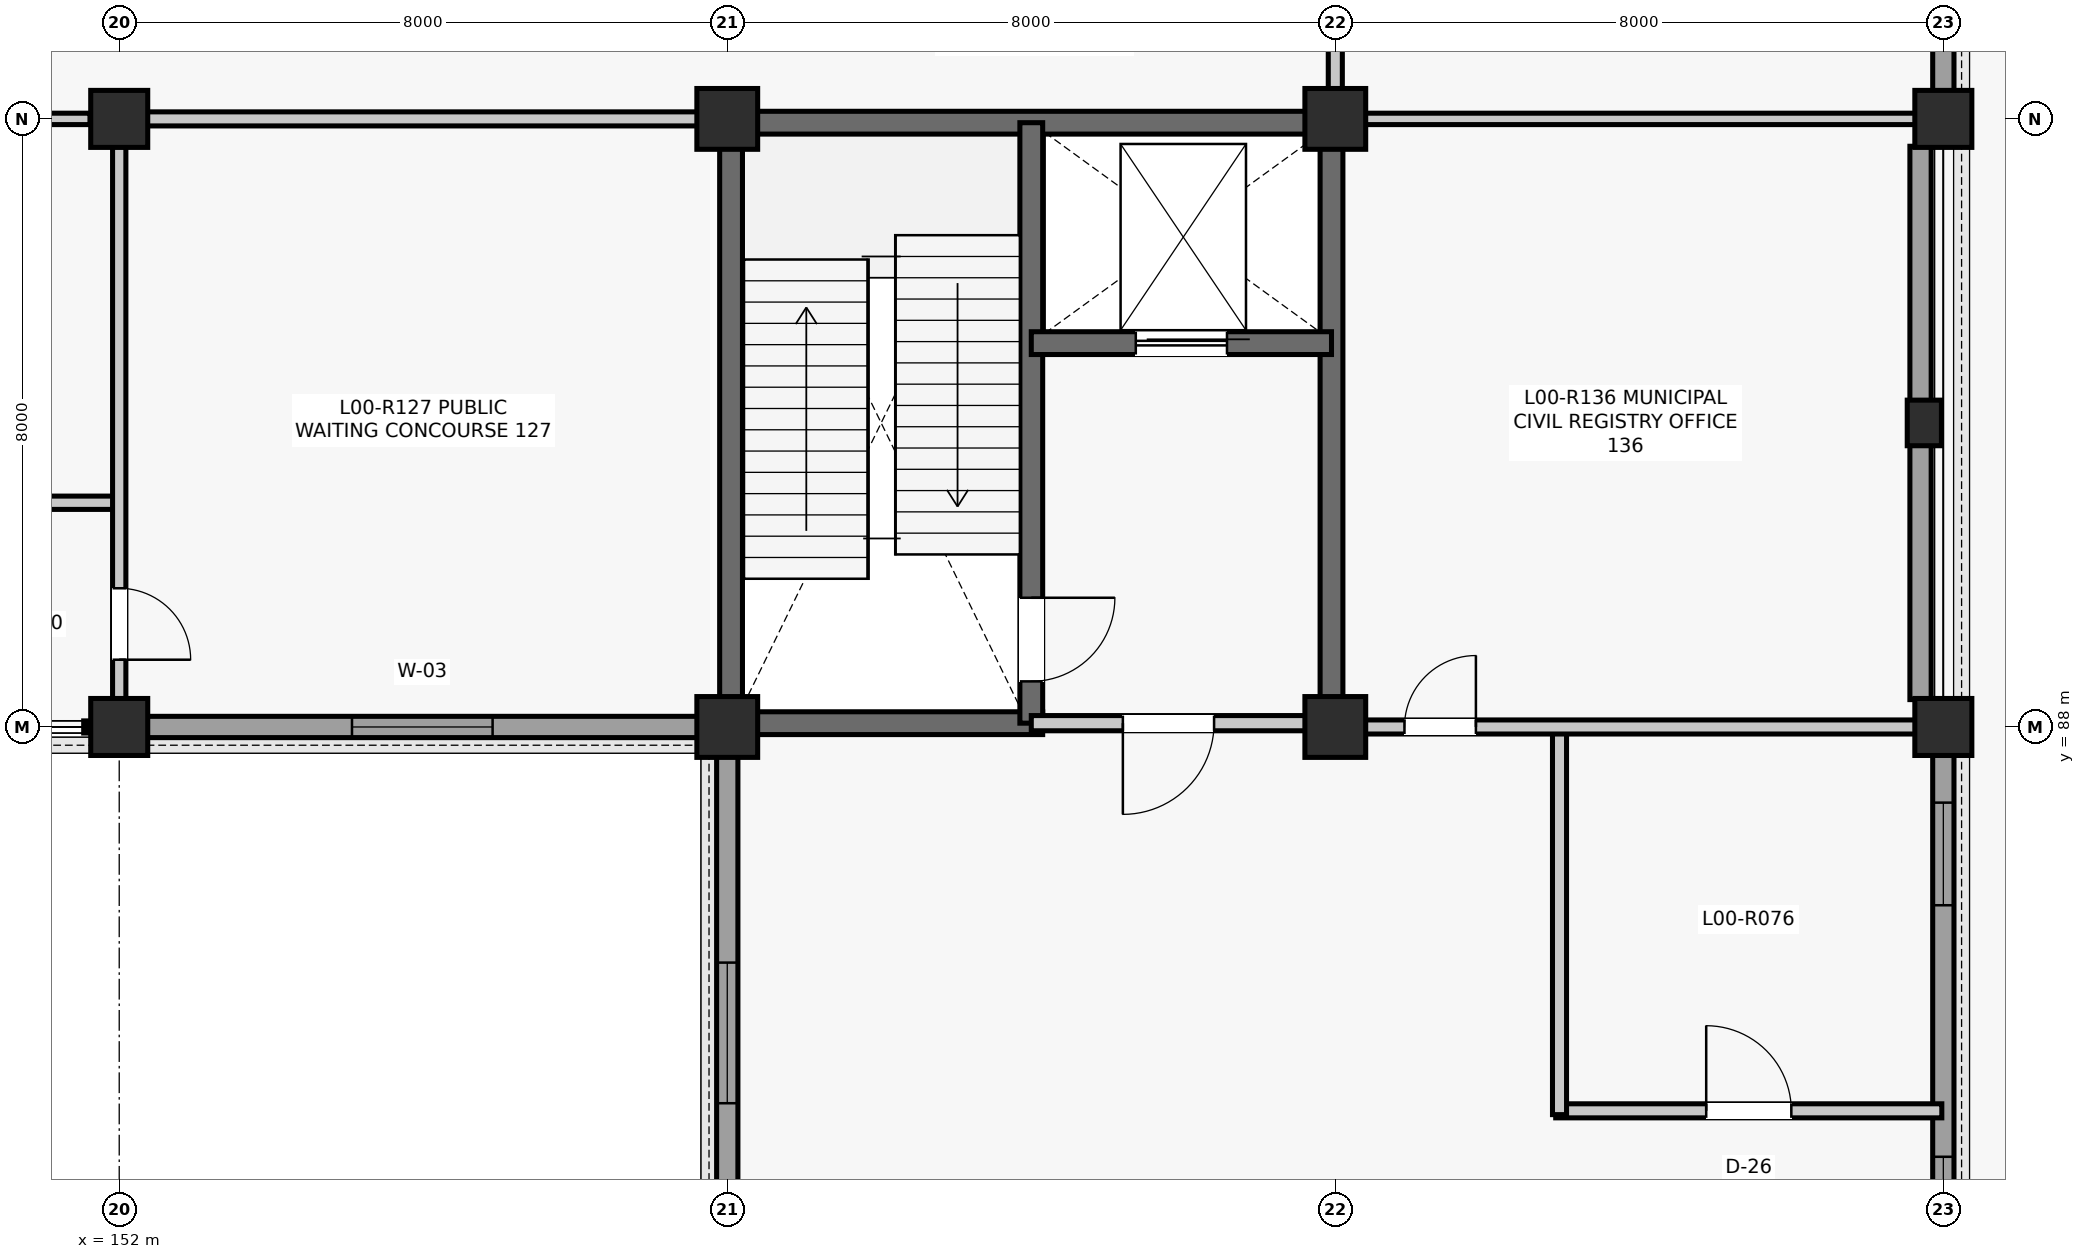
"""IFC4 building model, lengths in metres.
Left out: names, types, materials, properties, quantities, classifications, styles, units other than length and angle.
Written with IfcOpenShell. Run it as: python <this file> out.ifc"""

import sys

from ifc_helpers import new_model, si_unit, direction, frame, frame_2d, origin, origin_2d, place, context, subcontext, project, spatial, rectangle, extrude, element, fill, save


model = new_model("IFC4")
c1 = context("Model", 3, precision=1e-05, world=origin(), true_north=direction((0.0, 1.0)))
c2 = subcontext(c1, "Body", "Model", "MODEL_VIEW")
j1 = project(units=[si_unit("LENGTHUNIT", "METRE"), si_unit("PLANEANGLEUNIT", "RADIAN")], contexts=[c1])
p1 = place(None, origin())
s1 = spatial("IfcSite", under=j1, at=p1, CompositionType="ELEMENT")
p2 = place(p1, origin())
s2 = spatial("IfcBuilding", under=s1, at=p2, CompositionType="ELEMENT")
p3 = place(p2, origin())
s3 = spatial("IfcBuildingStorey", under=s2, at=p3, CompositionType="ELEMENT", Elevation=0.0)
for number, where, z_axis, x_axis in (
    (1, (152.0, 88.0, 0.0), (0.0, 0.0, 1.0), (1.0, 0.0, 0.0)),
    (2, (152.0, 96.0, 0.0), (0.0, 0.0, 1.0), (1.0, 0.0, 0.0)),
):
    element("IfcColumn", number, at=place(p3, frame(where, z_axis=z_axis, x_axis=x_axis)), inside=s3, PredefinedType="COLUMN", context=c2, shape_type="SweptSolid", body=[
        extrude(rectangle(XDim=0.75, YDim=0.75, at=origin_2d()), origin(), (0.0, 0.0, 1.0), 5.28),
    ])
for number, where, z_axis, x_axis in (
    (3, (160.0, 88.0, 0.0), (0.0, 0.0, 1.0), (1.0, 0.0, 0.0)),
    (4, (160.0, 96.0, 0.0), (0.0, 0.0, 1.0), (1.0, 0.0, 0.0)),
    (5, (168.0, 88.0, 0.0), (0.0, 0.0, 1.0), (1.0, 0.0, 0.0)),
    (6, (168.0, 96.0, 0.0), (0.0, 0.0, 1.0), (1.0, 0.0, 0.0)),
):
    element("IfcColumn", number, at=place(p3, frame(where, z_axis=z_axis, x_axis=x_axis)), inside=s3, PredefinedType="COLUMN", context=c2, shape_type="SweptSolid", body=[
        extrude(rectangle(XDim=0.8, YDim=0.8, at=origin_2d()), origin(), (0.0, 0.0, 1.0), 5.28),
    ])
for number, where, z_axis, x_axis in (
    (7, (176.0, 88.0, 0.0), (0.0, 0.0, 1.0), (1.0, 0.0, 0.0)),
    (8, (176.0, 96.0, 0.0), (0.0, 0.0, 1.0), (1.0, 0.0, 0.0)),
):
    element("IfcColumn", number, at=place(p3, frame(where, z_axis=z_axis, x_axis=x_axis)), inside=s3, PredefinedType="COLUMN", context=c2, shape_type="SweptSolid", body=[
        extrude(rectangle(XDim=0.75, YDim=0.75, at=origin_2d()), origin(), (0.0, 0.0, 1.0), 5.28),
    ])
p4 = place(p3, frame((175.75, 92.0, 0.0), z_axis=(0.0, 0.0, 1.0), x_axis=(1.0, 0.0, 0.0)))
e9 = element("IfcColumn", 9, at=p4, inside=s3, PredefinedType="PILASTER", context=c2, shape_type="SweptSolid", body=[
    extrude(rectangle(XDim=0.45, YDim=0.6, at=origin_2d()), origin(), (0.0, 0.0, 1.0), 5.28),
])
p5 = place(p3, frame((152.36, 88.0, 0.0), z_axis=(0.0, 0.0, 1.0), x_axis=(1.0, 0.0, 0.0)))
e10 = element("IfcWall", 10, at=p5, inside=s3, PredefinedType="SOLIDWALL", context=c2, shape_type="SweptSolid", body=[
    extrude(rectangle(XDim=7.255, YDim=0.28, at=frame_2d((3.627, 0.0))), origin(), (0.0, 0.0, 1.0), 4.614),
])
p6 = place(p5, frame((2.702, 0.0, 0.9)))
e11 = element("IfcOpeningElement", 11, at=p6, cuts=e10, PredefinedType="OPENING", context=c2, shape_type="SweptSolid", body=[
    extrude(rectangle(XDim=1.85, YDim=2.65, at=frame_2d((0.925, 1.325))), frame((0.0, 0.15, 0.0), z_axis=(0.0, -1.0, 0.0), x_axis=(1.0, 0.0, 0.0)), (0.0, 0.0, 1.0), 0.3),
])
p7 = place(p3, frame((160.0, 80.335, 0.0), z_axis=(0.0, 0.0, 1.0), x_axis=(0.0, 1.0, 0.0)))
e12 = element("IfcWall", 12, at=p7, inside=s3, PredefinedType="SOLIDWALL", context=c2, shape_type="SweptSolid", body=[
    extrude(rectangle(XDim=7.28, YDim=0.28, at=frame_2d((3.64, 0.0))), origin(), (0.0, 0.0, 1.0), 4.619),
])
p8 = place(p7, frame((2.715, 0.0, 0.9)))
e13 = element("IfcOpeningElement", 13, at=p8, cuts=e12, PredefinedType="OPENING", context=c2, shape_type="SweptSolid", body=[
    extrude(rectangle(XDim=1.85, YDim=2.65, at=frame_2d((0.925, 1.325))), frame((0.0, 0.15, 0.0), z_axis=(0.0, -1.0, 0.0), x_axis=(1.0, 0.0, 0.0)), (0.0, 0.0, 1.0), 0.3),
])
p9 = place(p3, frame((176.0, 80.36, 0.0), z_axis=(0.0, 0.0, 1.0), x_axis=(0.0, 1.0, 0.0)))
e14 = element("IfcWall", 14, at=p9, inside=s3, PredefinedType="SOLIDWALL", context=c2, shape_type="SweptSolid", body=[
    extrude(rectangle(XDim=7.28, YDim=0.28, at=frame_2d((3.64, 0.0))), origin(), (0.0, 0.0, 1.0), 4.61),
])
p10 = place(p9, frame((0.635, 0.0, 0.95)))
e15 = element("IfcOpeningElement", 15, at=p10, cuts=e14, PredefinedType="OPENING", context=c2, shape_type="SweptSolid", body=[
    extrude(rectangle(XDim=1.35, YDim=1.9, at=frame_2d((0.675, 0.95))), frame((0.0, 0.15, 0.0), z_axis=(0.0, -1.0, 0.0), x_axis=(1.0, 0.0, 0.0)), (0.0, 0.0, 1.0), 0.3),
])
p11 = place(p9, frame((5.295, 0.0, 0.95)))
e16 = element("IfcOpeningElement", 16, at=p11, cuts=e14, PredefinedType="OPENING", context=c2, shape_type="SweptSolid", body=[
    extrude(rectangle(XDim=1.35, YDim=1.9, at=frame_2d((0.675, 0.95))), frame((0.0, 0.15, 0.0), z_axis=(0.0, -1.0, 0.0), x_axis=(1.0, 0.0, 0.0)), (0.0, 0.0, 1.0), 0.3),
])
p12 = place(p3, frame((175.7, 88.36, 0.0), z_axis=(0.0, 0.0, 1.0), x_axis=(0.0, 1.0, 0.0)))
e17 = element("IfcWall", 17, at=p12, inside=s3, PredefinedType="SOLIDWALL", context=c2, shape_type="SweptSolid", body=[
    extrude(rectangle(XDim=7.28, YDim=0.28, at=frame_2d((3.64, 0.0))), origin(), (0.0, 0.0, 1.0), 4.674),
])
p13 = place(p3, frame((176.0, 96.36, 0.0), z_axis=(0.0, 0.0, 1.0), x_axis=(0.0, 1.0, 0.0)))
e18 = element("IfcWall", 18, at=p13, inside=s3, PredefinedType="SOLIDWALL", context=c2, shape_type="SweptSolid", body=[
    extrude(rectangle(XDim=7.28, YDim=0.28, at=frame_2d((3.64, 0.0))), origin(), (0.0, 0.0, 1.0), 4.614),
])
p14 = place(p13, frame((2.54, 0.0, 0.0)))
e19 = element("IfcOpeningElement", 19, at=p14, cuts=e18, PredefinedType="OPENING", context=c2, shape_type="SweptSolid", body=[
    extrude(rectangle(XDim=2.2, YDim=2.5, at=frame_2d((1.1, 1.25))), frame((0.0, 0.15, 0.0), z_axis=(0.0, -1.0, 0.0), x_axis=(1.0, 0.0, 0.0)), (0.0, 0.0, 1.0), 0.3),
])
for number, where, z_axis, x_axis in (
    (20, (160.05, 88.29, 0.0), (0.0, 0.0, 1.0), (0.0, 1.0, 0.0)),
    (21, (160.29, 95.95, 0.0), (0.0, 0.0, 1.0), (1.0, 0.0, 0.0)),
    (22, (167.95, 88.29, 0.0), (0.0, 0.0, 1.0), (0.0, 1.0, 0.0)),
):
    element("IfcWall", number, at=place(p3, frame(where, z_axis=z_axis, x_axis=x_axis)), inside=s3, PredefinedType="SHEAR", context=c2, shape_type="SweptSolid", body=[
        extrude(rectangle(XDim=7.42, YDim=0.3, at=frame_2d((3.71, 0.0))), origin(), (0.0, 0.0, 1.0), 5.035),
    ])
p15 = place(p3, frame((160.29, 88.05, 0.0), z_axis=(0.0, 0.0, 1.0), x_axis=(1.0, 0.0, 0.0)))
e23 = element("IfcWall", 23, at=p15, inside=s3, PredefinedType="SHEAR", context=c2, shape_type="SweptSolid", body=[
    extrude(rectangle(XDim=3.86, YDim=0.3, at=frame_2d((1.93, 0.0))), origin(), (0.0, 0.0, 1.0), 5.035),
])
p16 = place(p3, frame((164.0, 88.05, 0.0), z_axis=(0.0, 0.0, 1.0), x_axis=(0.0, 1.0, 0.0)))
e24 = element("IfcWall", 24, at=p16, inside=s3, PredefinedType="SHEAR", context=c2, shape_type="SweptSolid", body=[
    extrude(rectangle(XDim=7.9, YDim=0.3, at=frame_2d((3.95, 0.0))), origin(), (0.0, 0.0, 1.0), 5.035),
])
p17 = place(p16, frame((0.55, 0.0, 0.0)))
e25 = element("IfcOpeningElement", 25, at=p17, cuts=e24, PredefinedType="OPENING", context=c2, shape_type="SweptSolid", body=[
    extrude(rectangle(XDim=1.1, YDim=2.15, at=frame_2d((0.55, 1.075))), frame((0.0, 0.16, 0.0), z_axis=(0.0, -1.0, 0.0), x_axis=(1.0, 0.0, 0.0)), (0.0, 0.0, 1.0), 0.32),
])
p18 = place(p3, frame((164.0, 93.05, 0.0), z_axis=(0.0, 0.0, 1.0), x_axis=(1.0, 0.0, 0.0)))
e26 = element("IfcWall", 26, at=p18, inside=s3, PredefinedType="SHEAR", context=c2, shape_type="SweptSolid", body=[
    extrude(rectangle(XDim=3.95, YDim=0.3, at=frame_2d((1.975, 0.0))), origin(), (0.0, 0.0, 1.0), 5.035),
])
p19 = place(p18, frame((1.375, 0.0, 0.0)))
e27 = element("IfcOpeningElement", 27, at=p19, cuts=e26, PredefinedType="OPENING", context=c2, shape_type="SweptSolid", body=[
    extrude(rectangle(XDim=1.2, YDim=2.2, at=frame_2d((0.6, 1.1))), frame((0.0, 0.16, 0.0), z_axis=(0.0, -1.0, 0.0), x_axis=(1.0, 0.0, 0.0)), (0.0, 0.0, 1.0), 0.32),
])
p20 = place(p3, frame((164.0, 88.05, 0.0), z_axis=(0.0, 0.0, 1.0), x_axis=(1.0, 0.0, 0.0)))
e28 = element("IfcWall", 28, at=p20, inside=s3, PredefinedType="PARTITIONING", context=c2, shape_type="SweptSolid", body=[
    extrude(rectangle(XDim=3.61, YDim=0.2, at=frame_2d((1.805, 0.0))), origin(), (0.0, 0.0, 1.0), 4.404),
])
p21 = place(p20, frame((1.205, 0.0, 0.0)))
e29 = element("IfcOpeningElement", 29, at=p21, cuts=e28, PredefinedType="OPENING", context=c2, shape_type="SweptSolid", body=[
    extrude(rectangle(XDim=1.2, YDim=2.15, at=frame_2d((0.6, 1.075))), frame((0.0, 0.11, 0.0), z_axis=(0.0, -1.0, 0.0), x_axis=(1.0, 0.0, 0.0)), (0.0, 0.0, 1.0), 0.22),
])
p22 = place(p3, frame((146.9, 90.95, 0.0), z_axis=(0.0, 0.0, 1.0), x_axis=(1.0, 0.0, 0.0)))
e30 = element("IfcWall", 30, at=p22, inside=s3, PredefinedType="PARTITIONING", context=c2, shape_type="SweptSolid", body=[
    extrude(rectangle(XDim=5.08, YDim=0.175, at=frame_2d((2.54, 0.0))), origin(), (0.0, 0.0, 1.0), 4.404),
])
p23 = place(p22, frame((2.05, 0.0, 0.0)))
e31 = element("IfcOpeningElement", 31, at=p23, cuts=e30, PredefinedType="OPENING", context=c2, shape_type="SweptSolid", body=[
    extrude(rectangle(XDim=0.98, YDim=2.15, at=frame_2d((0.49, 1.075))), frame((0.0, 0.097, 0.0), z_axis=(0.0, -1.0, 0.0), x_axis=(1.0, 0.0, 0.0)), (0.0, 0.0, 1.0), 0.195),
])
p24 = place(p3, frame((146.95, 96.0, 0.0), z_axis=(0.0, 0.0, 1.0), x_axis=(1.0, 0.0, 0.0)))
e32 = element("IfcWall", 32, at=p24, inside=s3, PredefinedType="PARTITIONING", context=c2, shape_type="SweptSolid", body=[
    extrude(rectangle(XDim=4.665, YDim=0.15, at=frame_2d((2.333, 0.0))), origin(), (0.0, 0.0, 1.0), 4.336),
])
p25 = place(p3, frame((170.9, 82.95, 0.0), z_axis=(0.0, 0.0, 1.0), x_axis=(1.0, 0.0, 0.0)))
e33 = element("IfcWall", 33, at=p25, inside=s3, PredefinedType="PARTITIONING", context=c2, shape_type="SweptSolid", body=[
    extrude(rectangle(XDim=5.08, YDim=0.185, at=frame_2d((2.54, 0.0))), origin(), (0.0, 0.0, 1.0), 4.603),
])
p26 = place(p25, frame((1.98, 0.0, 0.0)))
e34 = element("IfcOpeningElement", 34, at=p26, cuts=e33, PredefinedType="OPENING", context=c2, shape_type="SweptSolid", body=[
    extrude(rectangle(XDim=1.12, YDim=2.22, at=frame_2d((0.56, 1.11))), frame((0.0, 0.103, 0.0), z_axis=(0.0, -1.0, 0.0), x_axis=(1.0, 0.0, 0.0)), (0.0, 0.0, 1.0), 0.205),
])
p27 = place(p3, frame((170.95, 82.9, 0.0), z_axis=(0.0, 0.0, 1.0), x_axis=(0.0, 1.0, 0.0)))
e35 = element("IfcWall", 35, at=p27, inside=s3, PredefinedType="PARTITIONING", context=c2, shape_type="SweptSolid", body=[
    extrude(rectangle(XDim=5.08, YDim=0.185, at=frame_2d((2.54, 0.0))), origin(), (0.0, 0.0, 1.0), 4.327),
])
p28 = place(p3, frame((152.0, 88.365, 0.0), z_axis=(0.0, 0.0, 1.0), x_axis=(0.0, 1.0, 0.0)))
e36 = element("IfcWall", 36, at=p28, inside=s3, PredefinedType="PARTITIONING", context=c2, shape_type="SweptSolid", body=[
    extrude(rectangle(XDim=7.27, YDim=0.175, at=frame_2d((3.635, 0.0))), origin(), (0.0, 0.0, 1.0), 4.404),
])
p29 = place(p28, frame((0.52, 0.0, 0.0)))
e37 = element("IfcOpeningElement", 37, at=p29, cuts=e36, PredefinedType="OPENING", context=c2, shape_type="SweptSolid", body=[
    extrude(rectangle(XDim=0.94, YDim=2.12, at=frame_2d((0.47, 1.06))), frame((0.0, 0.097, 0.0), z_axis=(0.0, -1.0, 0.0), x_axis=(1.0, 0.0, 0.0)), (0.0, 0.0, 1.0), 0.195),
])
p30 = place(p3, frame((152.365, 96.0, 0.0), z_axis=(0.0, 0.0, 1.0), x_axis=(1.0, 0.0, 0.0)))
e38 = element("IfcWall", 38, at=p30, inside=s3, PredefinedType="PARTITIONING", context=c2, shape_type="SweptSolid", body=[
    extrude(rectangle(XDim=7.245, YDim=0.185, at=frame_2d((3.623, 0.0))), origin(), (0.0, 0.0, 1.0), 4.404),
])
p31 = place(p3, frame((168.0, 96.39, 0.0), z_axis=(0.0, 0.0, 1.0), x_axis=(0.0, 1.0, 0.0)))
e39 = element("IfcWall", 39, at=p31, inside=s3, PredefinedType="PARTITIONING", context=c2, shape_type="SweptSolid", body=[
    extrude(rectangle(XDim=7.245, YDim=0.185, at=frame_2d((3.623, 0.0))), origin(), (0.0, 0.0, 1.0), 4.412),
])
p32 = place(p31, frame((0.52, 0.0, 0.0)))
e40 = element("IfcOpeningElement", 40, at=p32, cuts=e39, PredefinedType="OPENING", context=c2, shape_type="SweptSolid", body=[
    extrude(rectangle(XDim=0.94, YDim=2.12, at=frame_2d((0.47, 1.06))), frame((0.0, 0.103, 0.0), z_axis=(0.0, -1.0, 0.0), x_axis=(1.0, 0.0, 0.0)), (0.0, 0.0, 1.0), 0.205),
])
p33 = place(p3, frame((168.39, 88.0, 0.0), z_axis=(0.0, 0.0, 1.0), x_axis=(1.0, 0.0, 0.0)))
e41 = element("IfcWall", 41, at=p33, inside=s3, PredefinedType="PARTITIONING", context=c2, shape_type="SweptSolid", body=[
    extrude(rectangle(XDim=7.245, YDim=0.185, at=frame_2d((3.623, 0.0))), origin(), (0.0, 0.0, 1.0), 4.327),
])
p34 = place(p33, frame((0.52, 0.0, 0.0)))
e42 = element("IfcOpeningElement", 42, at=p34, cuts=e41, PredefinedType="OPENING", context=c2, shape_type="SweptSolid", body=[
    extrude(rectangle(XDim=0.94, YDim=2.12, at=frame_2d((0.47, 1.06))), frame((0.0, 0.103, 0.0), z_axis=(0.0, -1.0, 0.0), x_axis=(1.0, 0.0, 0.0)), (0.0, 0.0, 1.0), 0.205),
])
p35 = place(p3, frame((168.39, 96.0, 0.0), z_axis=(0.0, 0.0, 1.0), x_axis=(1.0, 0.0, 0.0)))
e43 = element("IfcWall", 43, at=p35, inside=s3, PredefinedType="PARTITIONING", context=c2, shape_type="SweptSolid", body=[
    extrude(rectangle(XDim=7.245, YDim=0.15, at=frame_2d((3.623, 0.0))), origin(), (0.0, 0.0, 1.0), 4.403),
])
p36 = place(p6, origin())
e44 = element("IfcWindow", 44, at=p36, inside=s3, PartitioningType="SINGLE_PANEL", PredefinedType="WINDOW", context=c2, shape_type="SweptSolid", body=[
    extrude(rectangle(XDim=1.85, YDim=2.65, at=frame_2d((0.925, 1.325))), frame((0.0, 0.03, 0.0), z_axis=(0.0, -1.0, 0.0), x_axis=(1.0, 0.0, 0.0)), (0.0, 0.0, 1.0), 0.06),
])
fill(e11, e44)
p37 = place(p8, origin())
e45 = element("IfcWindow", 45, at=p37, inside=s3, PartitioningType="SINGLE_PANEL", PredefinedType="WINDOW", context=c2, shape_type="SweptSolid", body=[
    extrude(rectangle(XDim=1.85, YDim=2.65, at=frame_2d((0.925, 1.325))), frame((0.0, 0.03, 0.0), z_axis=(0.0, -1.0, 0.0), x_axis=(1.0, 0.0, 0.0)), (0.0, 0.0, 1.0), 0.06),
])
fill(e13, e45)
p38 = place(p10, origin())
e46 = element("IfcWindow", 46, at=p38, inside=s3, PartitioningType="SINGLE_PANEL", PredefinedType="WINDOW", context=c2, shape_type="SweptSolid", body=[
    extrude(rectangle(XDim=1.35, YDim=1.9, at=frame_2d((0.675, 0.95))), frame((0.0, 0.03, 0.0), z_axis=(0.0, -1.0, 0.0), x_axis=(1.0, 0.0, 0.0)), (0.0, 0.0, 1.0), 0.06),
])
fill(e15, e46)
p39 = place(p11, origin())
e47 = element("IfcWindow", 47, at=p39, inside=s3, PartitioningType="SINGLE_PANEL", PredefinedType="WINDOW", context=c2, shape_type="SweptSolid", body=[
    extrude(rectangle(XDim=1.35, YDim=1.9, at=frame_2d((0.675, 0.95))), frame((0.0, 0.03, 0.0), z_axis=(0.0, -1.0, 0.0), x_axis=(1.0, 0.0, 0.0)), (0.0, 0.0, 1.0), 0.06),
])
fill(e16, e47)
p40 = place(p17, frame((1.1, 0.0, 0.0), z_axis=(0.0, 0.0, 1.0), x_axis=(-1.0, 0.0, 0.0)))
e48 = element("IfcDoor", 48, at=p40, inside=s3, OperationType="SINGLE_SWING_RIGHT", PredefinedType="DOOR", context=c2, shape_type="SweptSolid", body=[
    extrude(rectangle(XDim=1.1, YDim=2.15, at=frame_2d((0.55, 1.075))), frame((0.0, 0.025, 0.0), z_axis=(0.0, -1.0, 0.0), x_axis=(1.0, 0.0, 0.0)), (0.0, 0.0, 1.0), 0.05),
])
fill(e25, e48)
p41 = place(p19, origin())
e49 = element("IfcDoor", 49, at=p41, inside=s3, OperationType="SLIDING_TO_LEFT", PredefinedType="DOOR", context=c2, shape_type="SweptSolid", body=[
    extrude(rectangle(XDim=1.2, YDim=2.2, at=frame_2d((0.6, 1.1))), frame((0.0, 0.025, 0.0), z_axis=(0.0, -1.0, 0.0), x_axis=(1.0, 0.0, 0.0)), (0.0, 0.0, 1.0), 0.05),
])
fill(e27, e49)
p42 = place(p21, frame((1.2, 0.0, 0.0), z_axis=(0.0, 0.0, 1.0), x_axis=(-1.0, 0.0, 0.0)))
e50 = element("IfcDoor", 50, at=p42, inside=s3, OperationType="SINGLE_SWING_LEFT", PredefinedType="DOOR", context=c2, shape_type="SweptSolid", body=[
    extrude(rectangle(XDim=1.2, YDim=2.15, at=frame_2d((0.6, 1.075))), frame((0.0, 0.025, 0.0), z_axis=(0.0, -1.0, 0.0), x_axis=(1.0, 0.0, 0.0)), (0.0, 0.0, 1.0), 0.05),
])
fill(e29, e50)
p43 = place(p26, origin())
e51 = element("IfcDoor", 51, at=p43, inside=s3, OperationType="SINGLE_SWING_LEFT", PredefinedType="DOOR", context=c2, shape_type="SweptSolid", body=[
    extrude(rectangle(XDim=1.12, YDim=2.22, at=frame_2d((0.56, 1.11))), frame((0.0, 0.025, 0.0), z_axis=(0.0, -1.0, 0.0), x_axis=(1.0, 0.0, 0.0)), (0.0, 0.0, 1.0), 0.05),
])
fill(e34, e51)
p44 = place(p29, frame((0.94, 0.0, 0.0), z_axis=(0.0, 0.0, 1.0), x_axis=(-1.0, 0.0, 0.0)))
e52 = element("IfcDoor", 52, at=p44, inside=s3, OperationType="SINGLE_SWING_LEFT", PredefinedType="DOOR", context=c2, shape_type="SweptSolid", body=[
    extrude(rectangle(XDim=0.94, YDim=2.12, at=frame_2d((0.47, 1.06))), frame((0.0, 0.025, 0.0), z_axis=(0.0, -1.0, 0.0), x_axis=(1.0, 0.0, 0.0)), (0.0, 0.0, 1.0), 0.05),
])
fill(e37, e52)
p45 = place(p34, origin())
e53 = element("IfcDoor", 53, at=p45, inside=s3, OperationType="SINGLE_SWING_RIGHT", PredefinedType="DOOR", context=c2, shape_type="SweptSolid", body=[
    extrude(rectangle(XDim=0.94, YDim=2.12, at=frame_2d((0.47, 1.06))), frame((0.0, 0.025, 0.0), z_axis=(0.0, -1.0, 0.0), x_axis=(1.0, 0.0, 0.0)), (0.0, 0.0, 1.0), 0.05),
])
fill(e42, e53)
save(model, sys.argv[1])
